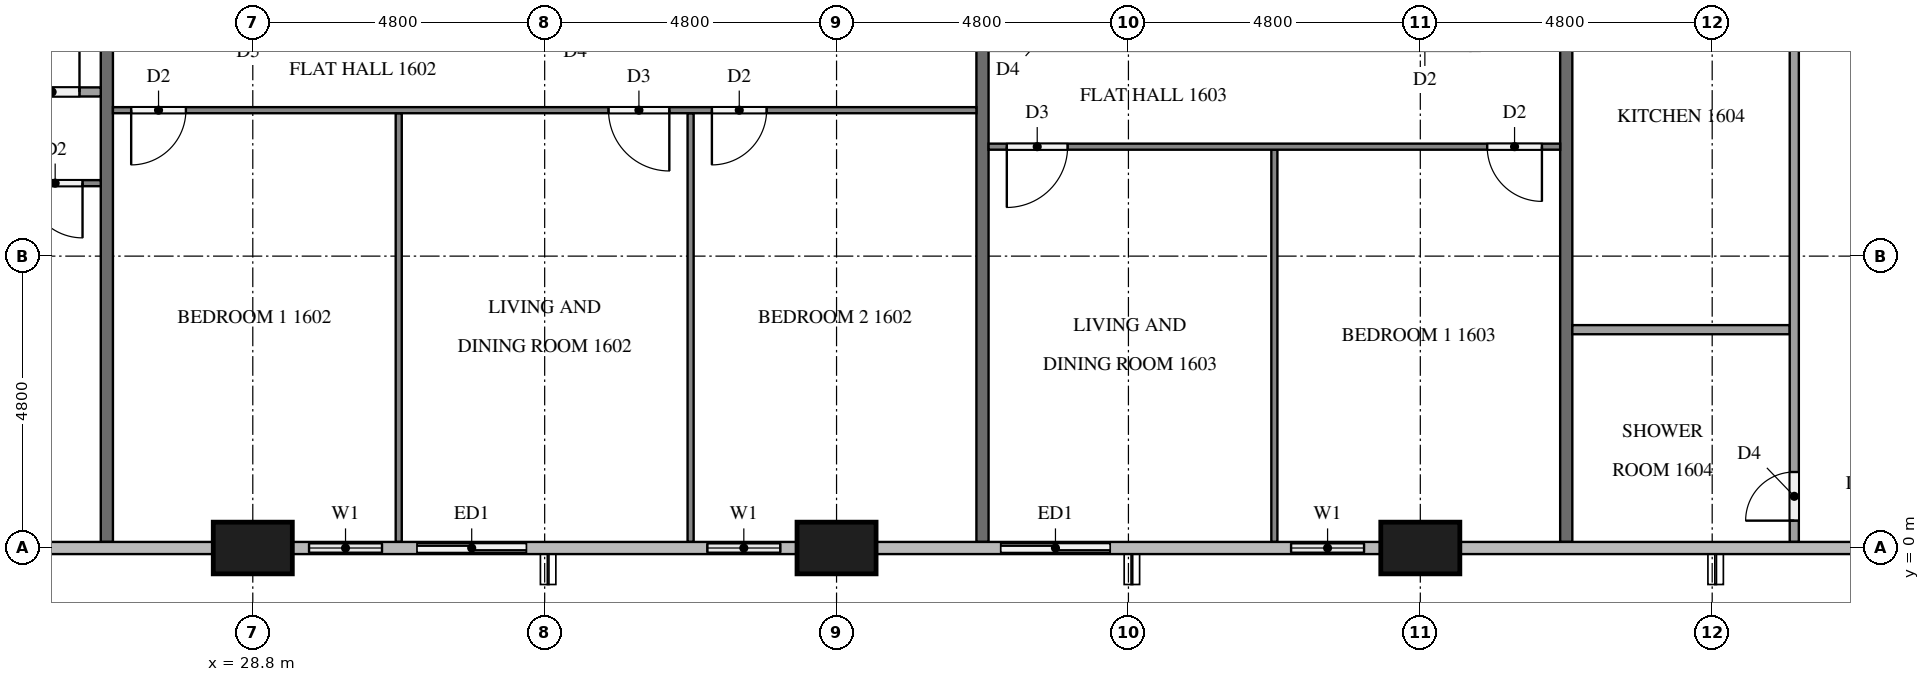
"""IFC4 building model, lengths in metres.
Left out: names, types, materials, properties, quantities, classifications, styles, units other than length and angle.
Written with IfcOpenShell. Run it as: python <this file> out.ifc"""

import sys

from ifc_helpers import new_model, si_unit, direction, frame, frame_2d, origin, origin_2d, place, context, subcontext, project, spatial, rectangle, extrude, element, fill, save


model = new_model("IFC4")
c1 = context("Model", 3, precision=1e-05, world=origin(), true_north=direction((0.0, 1.0)))
c2 = subcontext(c1, "Body", "Model", "MODEL_VIEW")
j1 = project(units=[si_unit("LENGTHUNIT", "METRE"), si_unit("PLANEANGLEUNIT", "RADIAN")], contexts=[c1])
p1 = place(None, origin())
s1 = spatial("IfcSite", under=j1, at=p1, CompositionType="ELEMENT")
p2 = place(p1, origin())
s2 = spatial("IfcBuilding", under=s1, at=p2, CompositionType="ELEMENT")
p3 = place(p2, frame((0.0, 0.0, 66.3)))
s3 = spatial("IfcBuildingStorey", under=s2, at=p3, CompositionType="ELEMENT", Elevation=66.3)
for number, where, z_axis, x_axis in (
    (1, (28.8, 0.0, 0.0), (0.0, 0.0, 1.0), (1.0, 0.0, 0.0)),
    (2, (38.4, 0.0, 0.0), (0.0, 0.0, 1.0), (1.0, 0.0, 0.0)),
    (3, (48.0, 0.0, 0.0), (0.0, 0.0, 1.0), (1.0, 0.0, 0.0)),
):
    element("IfcColumn", number, at=place(p3, frame(where, z_axis=z_axis, x_axis=x_axis)), inside=s3, PredefinedType="COLUMN", context=c2, shape_type="SweptSolid", body=[
        extrude(rectangle(XDim=1.3, YDim=0.85, at=origin_2d()), origin(), (0.0, 0.0, 1.0), 3.2),
    ])
p4 = place(p3, frame((29.45, 0.0, 0.0), z_axis=(0.0, 0.0, 1.0), x_axis=(1.0, 0.0, 0.0)))
e4 = element("IfcWall", 4, at=p4, inside=s3, PredefinedType="SOLIDWALL", context=c2, shape_type="SweptSolid", body=[
    extrude(rectangle(XDim=4.15, YDim=0.15, at=frame_2d((2.075, 0.0))), origin(), (0.0, 0.0, 1.0), 3.2),
])
p5 = place(p4, frame((0.275, 0.0, 0.9)))
e5 = element("IfcOpeningElement", 5, at=p5, cuts=e4, PredefinedType="OPENING", context=c2, shape_type="SweptSolid", body=[
    extrude(rectangle(XDim=1.2, YDim=1.4, at=frame_2d((0.6, 0.7))), frame((0.0, 0.085, 0.0), z_axis=(0.0, -1.0, 0.0), x_axis=(1.0, 0.0, 0.0)), (0.0, 0.0, 1.0), 0.17),
])
p6 = place(p4, frame((2.05, 0.0, 0.0)))
e6 = element("IfcOpeningElement", 6, at=p6, cuts=e4, PredefinedType="OPENING", context=c2, shape_type="SweptSolid", body=[
    extrude(rectangle(XDim=1.8, YDim=2.4, at=frame_2d((0.9, 1.2))), frame((0.0, 0.085, 0.0), z_axis=(0.0, -1.0, 0.0), x_axis=(1.0, 0.0, 0.0)), (0.0, 0.0, 1.0), 0.17),
])
p7 = place(p3, frame((36.0, 0.0, 0.0), z_axis=(0.0, 0.0, 1.0), x_axis=(1.0, 0.0, 0.0)))
e7 = element("IfcWall", 7, at=p7, inside=s3, PredefinedType="SOLIDWALL", context=c2, shape_type="SweptSolid", body=[
    extrude(rectangle(XDim=1.75, YDim=0.15, at=frame_2d((0.875, 0.0))), origin(), (0.0, 0.0, 1.0), 3.2),
])
p8 = place(p7, frame((0.275, 0.0, 0.9)))
e8 = element("IfcOpeningElement", 8, at=p8, cuts=e7, PredefinedType="OPENING", context=c2, shape_type="SweptSolid", body=[
    extrude(rectangle(XDim=1.2, YDim=1.4, at=frame_2d((0.6, 0.7))), frame((0.0, 0.085, 0.0), z_axis=(0.0, -1.0, 0.0), x_axis=(1.0, 0.0, 0.0)), (0.0, 0.0, 1.0), 0.17),
])
p9 = place(p3, frame((40.8, 0.0, 0.0), z_axis=(0.0, 0.0, 1.0), x_axis=(1.0, 0.0, 0.0)))
e9 = element("IfcWall", 9, at=p9, inside=s3, PredefinedType="SOLIDWALL", context=c2, shape_type="SweptSolid", body=[
    extrude(rectangle(XDim=2.4, YDim=0.15, at=frame_2d((1.2, 0.0))), origin(), (0.0, 0.0, 1.0), 3.2),
])
p10 = place(p9, frame((0.3, 0.0, 0.0)))
e10 = element("IfcOpeningElement", 10, at=p10, cuts=e9, PredefinedType="OPENING", context=c2, shape_type="SweptSolid", body=[
    extrude(rectangle(XDim=1.8, YDim=2.4, at=frame_2d((0.9, 1.2))), frame((0.0, 0.085, 0.0), z_axis=(0.0, -1.0, 0.0), x_axis=(1.0, 0.0, 0.0)), (0.0, 0.0, 1.0), 0.17),
])
p11 = place(p3, frame((45.6, 0.0, 0.0), z_axis=(0.0, 0.0, 1.0), x_axis=(1.0, 0.0, 0.0)))
e11 = element("IfcWall", 11, at=p11, inside=s3, PredefinedType="SOLIDWALL", context=c2, shape_type="SweptSolid", body=[
    extrude(rectangle(XDim=1.75, YDim=0.15, at=frame_2d((0.875, 0.0))), origin(), (0.0, 0.0, 1.0), 3.2),
])
p12 = place(p11, frame((0.275, 0.0, 0.9)))
e12 = element("IfcOpeningElement", 12, at=p12, cuts=e11, PredefinedType="OPENING", context=c2, shape_type="SweptSolid", body=[
    extrude(rectangle(XDim=1.2, YDim=1.4, at=frame_2d((0.6, 0.7))), frame((0.0, 0.085, 0.0), z_axis=(0.0, -1.0, 0.0), x_axis=(1.0, 0.0, 0.0)), (0.0, 0.0, 1.0), 0.17),
])
for number, where, z_axis, x_axis in (
    (13, (26.4, 11.9, 0.0), (0.0, 0.0, 1.0), (0.0, -1.0, 0.0)),
    (14, (40.8, 11.9, 0.0), (0.0, 0.0, 1.0), (0.0, -1.0, 0.0)),
    (15, (50.4, 11.9, 0.0), (0.0, 0.0, 1.0), (0.0, -1.0, 0.0)),
):
    element("IfcWall", number, at=place(p3, frame(where, z_axis=z_axis, x_axis=x_axis)), inside=s3, PredefinedType="PARTITIONING", context=c2, shape_type="SweptSolid", body=[
        extrude(rectangle(XDim=11.8, YDim=0.2, at=frame_2d((5.9, 0.0))), origin(), (0.0, 0.0, 1.0), 3.2),
    ])
p13 = place(p3, frame((26.3, 6.0, 0.0), z_axis=(0.0, 0.0, 1.0), x_axis=(-1.0, 0.0, 0.0)))
e16 = element("IfcWall", 16, at=p13, inside=s3, PredefinedType="PARTITIONING", context=c2, shape_type="SweptSolid", body=[
    extrude(rectangle(XDim=14.2, YDim=0.1, at=frame_2d((7.1, 0.0))), origin(), (0.0, 0.0, 1.0), 3.2),
])
p14 = place(p13, frame((9.85, 0.0, 0.0)))
e17 = element("IfcOpeningElement", 17, at=p14, cuts=e16, PredefinedType="OPENING", context=c2, shape_type="SweptSolid", body=[
    extrude(rectangle(XDim=0.9, YDim=2.1, at=frame_2d((0.45, 1.05))), frame((0.0, 0.06, 0.0), z_axis=(0.0, -1.0, 0.0), x_axis=(1.0, 0.0, 0.0)), (0.0, 0.0, 1.0), 0.12),
])
p15 = place(p13, frame((8.15, 0.0, 0.0)))
e18 = element("IfcOpeningElement", 18, at=p15, cuts=e16, PredefinedType="OPENING", context=c2, shape_type="SweptSolid", body=[
    extrude(rectangle(XDim=1.0, YDim=2.1, at=frame_2d((0.5, 1.05))), frame((0.0, 0.06, 0.0), z_axis=(0.0, -1.0, 0.0), x_axis=(1.0, 0.0, 0.0)), (0.0, 0.0, 1.0), 0.12),
])
p16 = place(p13, frame((0.3, 0.0, 0.0)))
e19 = element("IfcOpeningElement", 19, at=p16, cuts=e16, PredefinedType="OPENING", context=c2, shape_type="SweptSolid", body=[
    extrude(rectangle(XDim=0.9, YDim=2.1, at=frame_2d((0.45, 1.05))), frame((0.0, 0.06, 0.0), z_axis=(0.0, -1.0, 0.0), x_axis=(1.0, 0.0, 0.0)), (0.0, 0.0, 1.0), 0.12),
])
p17 = place(p3, frame((13.575, 7.5, 0.0), z_axis=(0.0, 0.0, 1.0), x_axis=(1.0, 0.0, 0.0)))
e20 = element("IfcWall", 20, at=p17, inside=s3, PredefinedType="PARTITIONING", context=c2, shape_type="SweptSolid", body=[
    extrude(rectangle(XDim=12.725, YDim=0.15, at=frame_2d((6.363, 0.0))), origin(), (0.0, 0.0, 1.0), 3.2),
])
p18 = place(p17, frame((2.69, 0.0, 0.0)))
e21 = element("IfcOpeningElement", 21, at=p18, cuts=e20, PredefinedType="OPENING", context=c2, shape_type="SweptSolid", body=[
    extrude(rectangle(XDim=0.9, YDim=2.1, at=frame_2d((0.45, 1.05))), frame((0.0, 0.085, 0.0), z_axis=(0.0, -1.0, 0.0), x_axis=(1.0, 0.0, 0.0)), (0.0, 0.0, 1.0), 0.17),
])
p19 = place(p17, frame((4.24, 0.0, 0.0)))
e22 = element("IfcOpeningElement", 22, at=p19, cuts=e20, PredefinedType="OPENING", context=c2, shape_type="SweptSolid", body=[
    extrude(rectangle(XDim=0.8, YDim=2.1, at=frame_2d((0.4, 1.05))), frame((0.0, 0.085, 0.0), z_axis=(0.0, -1.0, 0.0), x_axis=(1.0, 0.0, 0.0)), (0.0, 0.0, 1.0), 0.17),
])
p20 = place(p17, frame((11.475, 0.0, 0.0)))
e23 = element("IfcOpeningElement", 23, at=p20, cuts=e20, PredefinedType="OPENING", context=c2, shape_type="SweptSolid", body=[
    extrude(rectangle(XDim=0.9, YDim=2.1, at=frame_2d((0.45, 1.05))), frame((0.0, 0.085, 0.0), z_axis=(0.0, -1.0, 0.0), x_axis=(1.0, 0.0, 0.0)), (0.0, 0.0, 1.0), 0.17),
])
for number, where, z_axis, x_axis in (
    (24, (31.2, 7.15, 0.0), (0.0, 0.0, 1.0), (0.0, -1.0, 0.0)),
    (25, (36.0, 7.15, 0.0), (0.0, 0.0, 1.0), (0.0, -1.0, 0.0)),
):
    element("IfcWall", number, at=place(p3, frame(where, z_axis=z_axis, x_axis=x_axis)), inside=s3, PredefinedType="PARTITIONING", context=c2, shape_type="SweptSolid", body=[
        extrude(rectangle(XDim=7.05, YDim=0.1, at=frame_2d((3.525, 0.0))), origin(), (0.0, 0.0, 1.0), 3.2),
    ])
p21 = place(p3, frame((40.7, 7.2, 0.0), z_axis=(0.0, 0.0, 1.0), x_axis=(-1.0, 0.0, 0.0)))
e26 = element("IfcWall", 26, at=p21, inside=s3, PredefinedType="PARTITIONING", context=c2, shape_type="SweptSolid", body=[
    extrude(rectangle(XDim=14.2, YDim=0.1, at=frame_2d((7.1, 0.0))), origin(), (0.0, 0.0, 1.0), 3.2),
])
p22 = place(p21, frame((13.0, 0.0, 0.0)))
e27 = element("IfcOpeningElement", 27, at=p22, cuts=e26, PredefinedType="OPENING", context=c2, shape_type="SweptSolid", body=[
    extrude(rectangle(XDim=0.9, YDim=2.1, at=frame_2d((0.45, 1.05))), frame((0.0, 0.06, 0.0), z_axis=(0.0, -1.0, 0.0), x_axis=(1.0, 0.0, 0.0)), (0.0, 0.0, 1.0), 0.12),
])
p23 = place(p21, frame((5.05, 0.0, 0.0)))
e28 = element("IfcOpeningElement", 28, at=p23, cuts=e26, PredefinedType="OPENING", context=c2, shape_type="SweptSolid", body=[
    extrude(rectangle(XDim=1.0, YDim=2.1, at=frame_2d((0.5, 1.05))), frame((0.0, 0.06, 0.0), z_axis=(0.0, -1.0, 0.0), x_axis=(1.0, 0.0, 0.0)), (0.0, 0.0, 1.0), 0.12),
])
p24 = place(p21, frame((3.45, 0.0, 0.0)))
e29 = element("IfcOpeningElement", 29, at=p24, cuts=e26, PredefinedType="OPENING", context=c2, shape_type="SweptSolid", body=[
    extrude(rectangle(XDim=0.9, YDim=2.1, at=frame_2d((0.45, 1.05))), frame((0.0, 0.06, 0.0), z_axis=(0.0, -1.0, 0.0), x_axis=(1.0, 0.0, 0.0)), (0.0, 0.0, 1.0), 0.12),
])
p25 = place(p3, frame((45.6, 6.55, 0.0), z_axis=(0.0, 0.0, 1.0), x_axis=(0.0, -1.0, 0.0)))
e30 = element("IfcWall", 30, at=p25, inside=s3, PredefinedType="PARTITIONING", context=c2, shape_type="SweptSolid", body=[
    extrude(rectangle(XDim=6.45, YDim=0.1, at=frame_2d((3.225, 0.0))), origin(), (0.0, 0.0, 1.0), 3.2),
])
p26 = place(p3, frame((50.3, 6.6, 0.0), z_axis=(0.0, 0.0, 1.0), x_axis=(-1.0, 0.0, 0.0)))
e31 = element("IfcWall", 31, at=p26, inside=s3, PredefinedType="PARTITIONING", context=c2, shape_type="SweptSolid", body=[
    extrude(rectangle(XDim=9.4, YDim=0.1, at=frame_2d((4.7, 0.0))), origin(), (0.0, 0.0, 1.0), 3.2),
])
p27 = place(p26, frame((0.3, 0.0, 0.0)))
e32 = element("IfcOpeningElement", 32, at=p27, cuts=e31, PredefinedType="OPENING", context=c2, shape_type="SweptSolid", body=[
    extrude(rectangle(XDim=0.9, YDim=2.1, at=frame_2d((0.45, 1.05))), frame((0.0, 0.06, 0.0), z_axis=(0.0, -1.0, 0.0), x_axis=(1.0, 0.0, 0.0)), (0.0, 0.0, 1.0), 0.12),
])
p28 = place(p26, frame((8.1, 0.0, 0.0)))
e33 = element("IfcOpeningElement", 33, at=p28, cuts=e31, PredefinedType="OPENING", context=c2, shape_type="SweptSolid", body=[
    extrude(rectangle(XDim=1.0, YDim=2.1, at=frame_2d((0.5, 1.05))), frame((0.0, 0.06, 0.0), z_axis=(0.0, -1.0, 0.0), x_axis=(1.0, 0.0, 0.0)), (0.0, 0.0, 1.0), 0.12),
])
p29 = place(p3, frame((50.5, 3.59, 0.0), z_axis=(0.0, 0.0, 1.0), x_axis=(1.0, 0.0, 0.0)))
e34 = element("IfcWall", 34, at=p29, inside=s3, PredefinedType="PARTITIONING", context=c2, shape_type="SweptSolid", body=[
    extrude(rectangle(XDim=3.575, YDim=0.15, at=frame_2d((1.788, 0.0))), origin(), (0.0, 0.0, 1.0), 3.2),
])
p30 = place(p3, frame((54.15, 0.1, 0.0), z_axis=(0.0, 0.0, 1.0), x_axis=(0.0, 1.0, 0.0)))
e35 = element("IfcWall", 35, at=p30, inside=s3, PredefinedType="PARTITIONING", context=c2, shape_type="SweptSolid", body=[
    extrude(rectangle(XDim=15.125, YDim=0.15, at=frame_2d((7.562, 0.0))), origin(), (0.0, 0.0, 1.0), 3.2),
])
p31 = place(p30, frame((10.796, 0.0, 0.0)))
e36 = element("IfcOpeningElement", 36, at=p31, cuts=e35, PredefinedType="OPENING", context=c2, shape_type="SweptSolid", body=[
    extrude(rectangle(XDim=0.9, YDim=2.1, at=frame_2d((0.45, 1.05))), frame((0.0, 0.085, 0.0), z_axis=(0.0, -1.0, 0.0), x_axis=(1.0, 0.0, 0.0)), (0.0, 0.0, 1.0), 0.17),
])
p32 = place(p30, frame((9.246, 0.0, 0.0)))
e37 = element("IfcOpeningElement", 37, at=p32, cuts=e35, PredefinedType="OPENING", context=c2, shape_type="SweptSolid", body=[
    extrude(rectangle(XDim=0.9, YDim=2.1, at=frame_2d((0.45, 1.05))), frame((0.0, 0.085, 0.0), z_axis=(0.0, -1.0, 0.0), x_axis=(1.0, 0.0, 0.0)), (0.0, 0.0, 1.0), 0.17),
])
p33 = place(p30, frame((0.35, 0.0, 0.0)))
e38 = element("IfcOpeningElement", 38, at=p33, cuts=e35, PredefinedType="OPENING", context=c2, shape_type="SweptSolid", body=[
    extrude(rectangle(XDim=0.8, YDim=2.1, at=frame_2d((0.4, 1.05))), frame((0.0, 0.085, 0.0), z_axis=(0.0, -1.0, 0.0), x_axis=(1.0, 0.0, 0.0)), (0.0, 0.0, 1.0), 0.17),
])
p34 = place(p5, origin())
e39 = element("IfcWindow", 39, at=p34, inside=s3, PartitioningType="SINGLE_PANEL", PredefinedType="WINDOW", context=c2, shape_type="SweptSolid", body=[
    extrude(rectangle(XDim=1.2, YDim=1.4, at=frame_2d((0.6, 0.7))), frame((0.0, 0.03, 0.0), z_axis=(0.0, -1.0, 0.0), x_axis=(1.0, 0.0, 0.0)), (0.0, 0.0, 1.0), 0.06),
])
fill(e5, e39)
p35 = place(p6, origin())
e40 = element("IfcDoor", 40, at=p35, inside=s3, OperationType="SLIDING_TO_LEFT", PredefinedType="DOOR", context=c2, shape_type="SweptSolid", body=[
    extrude(rectangle(XDim=1.8, YDim=2.4, at=frame_2d((0.9, 1.2))), frame((0.0, 0.025, 0.0), z_axis=(0.0, -1.0, 0.0), x_axis=(1.0, 0.0, 0.0)), (0.0, 0.0, 1.0), 0.05),
])
fill(e6, e40)
p36 = place(p8, origin())
e41 = element("IfcWindow", 41, at=p36, inside=s3, PartitioningType="SINGLE_PANEL", PredefinedType="WINDOW", context=c2, shape_type="SweptSolid", body=[
    extrude(rectangle(XDim=1.2, YDim=1.4, at=frame_2d((0.6, 0.7))), frame((0.0, 0.03, 0.0), z_axis=(0.0, -1.0, 0.0), x_axis=(1.0, 0.0, 0.0)), (0.0, 0.0, 1.0), 0.06),
])
fill(e8, e41)
p37 = place(p10, origin())
e42 = element("IfcDoor", 42, at=p37, inside=s3, OperationType="SLIDING_TO_RIGHT", PredefinedType="DOOR", context=c2, shape_type="SweptSolid", body=[
    extrude(rectangle(XDim=1.8, YDim=2.4, at=frame_2d((0.9, 1.2))), frame((0.0, 0.025, 0.0), z_axis=(0.0, -1.0, 0.0), x_axis=(1.0, 0.0, 0.0)), (0.0, 0.0, 1.0), 0.05),
])
fill(e10, e42)
p38 = place(p12, origin())
e43 = element("IfcWindow", 43, at=p38, inside=s3, PartitioningType="SINGLE_PANEL", PredefinedType="WINDOW", context=c2, shape_type="SweptSolid", body=[
    extrude(rectangle(XDim=1.2, YDim=1.4, at=frame_2d((0.6, 0.7))), frame((0.0, 0.03, 0.0), z_axis=(0.0, -1.0, 0.0), x_axis=(1.0, 0.0, 0.0)), (0.0, 0.0, 1.0), 0.06),
])
fill(e12, e43)
p39 = place(p16, origin())
e44 = element("IfcDoor", 44, at=p39, inside=s3, OperationType="SINGLE_SWING_LEFT", PredefinedType="DOOR", context=c2, shape_type="SweptSolid", body=[
    extrude(rectangle(XDim=0.9, YDim=2.1, at=frame_2d((0.45, 1.05))), frame((0.0, 0.025, 0.0), z_axis=(0.0, -1.0, 0.0), x_axis=(1.0, 0.0, 0.0)), (0.0, 0.0, 1.0), 0.05),
])
fill(e19, e44)
p40 = place(p20, origin())
e45 = element("IfcDoor", 45, at=p40, inside=s3, OperationType="SINGLE_SWING_RIGHT", PredefinedType="DOOR", context=c2, shape_type="SweptSolid", body=[
    extrude(rectangle(XDim=0.9, YDim=2.1, at=frame_2d((0.45, 1.05))), frame((0.0, 0.025, 0.0), z_axis=(0.0, -1.0, 0.0), x_axis=(1.0, 0.0, 0.0)), (0.0, 0.0, 1.0), 0.05),
])
fill(e23, e45)
p41 = place(p22, origin())
e46 = element("IfcDoor", 46, at=p41, inside=s3, OperationType="SINGLE_SWING_RIGHT", PredefinedType="DOOR", context=c2, shape_type="SweptSolid", body=[
    extrude(rectangle(XDim=0.9, YDim=2.1, at=frame_2d((0.45, 1.05))), frame((0.0, 0.025, 0.0), z_axis=(0.0, -1.0, 0.0), x_axis=(1.0, 0.0, 0.0)), (0.0, 0.0, 1.0), 0.05),
])
fill(e27, e46)
p42 = place(p23, origin())
e47 = element("IfcDoor", 47, at=p42, inside=s3, OperationType="SINGLE_SWING_LEFT", PredefinedType="DOOR", context=c2, shape_type="SweptSolid", body=[
    extrude(rectangle(XDim=1.0, YDim=2.1, at=frame_2d((0.5, 1.05))), frame((0.0, 0.025, 0.0), z_axis=(0.0, -1.0, 0.0), x_axis=(1.0, 0.0, 0.0)), (0.0, 0.0, 1.0), 0.05),
])
fill(e28, e47)
p43 = place(p24, origin())
e48 = element("IfcDoor", 48, at=p43, inside=s3, OperationType="SINGLE_SWING_RIGHT", PredefinedType="DOOR", context=c2, shape_type="SweptSolid", body=[
    extrude(rectangle(XDim=0.9, YDim=2.1, at=frame_2d((0.45, 1.05))), frame((0.0, 0.025, 0.0), z_axis=(0.0, -1.0, 0.0), x_axis=(1.0, 0.0, 0.0)), (0.0, 0.0, 1.0), 0.05),
])
fill(e29, e48)
p44 = place(p27, origin())
e49 = element("IfcDoor", 49, at=p44, inside=s3, OperationType="SINGLE_SWING_LEFT", PredefinedType="DOOR", context=c2, shape_type="SweptSolid", body=[
    extrude(rectangle(XDim=0.9, YDim=2.1, at=frame_2d((0.45, 1.05))), frame((0.0, 0.025, 0.0), z_axis=(0.0, -1.0, 0.0), x_axis=(1.0, 0.0, 0.0)), (0.0, 0.0, 1.0), 0.05),
])
fill(e32, e49)
p45 = place(p28, origin())
e50 = element("IfcDoor", 50, at=p45, inside=s3, OperationType="SINGLE_SWING_RIGHT", PredefinedType="DOOR", context=c2, shape_type="SweptSolid", body=[
    extrude(rectangle(XDim=1.0, YDim=2.1, at=frame_2d((0.5, 1.05))), frame((0.0, 0.025, 0.0), z_axis=(0.0, -1.0, 0.0), x_axis=(1.0, 0.0, 0.0)), (0.0, 0.0, 1.0), 0.05),
])
fill(e33, e50)
p46 = place(p33, origin())
e51 = element("IfcDoor", 51, at=p46, inside=s3, OperationType="SINGLE_SWING_LEFT", PredefinedType="DOOR", context=c2, shape_type="SweptSolid", body=[
    extrude(rectangle(XDim=0.8, YDim=2.1, at=frame_2d((0.4, 1.05))), frame((0.0, 0.025, 0.0), z_axis=(0.0, -1.0, 0.0), x_axis=(1.0, 0.0, 0.0)), (0.0, 0.0, 1.0), 0.05),
])
fill(e38, e51)
save(model, sys.argv[1])
